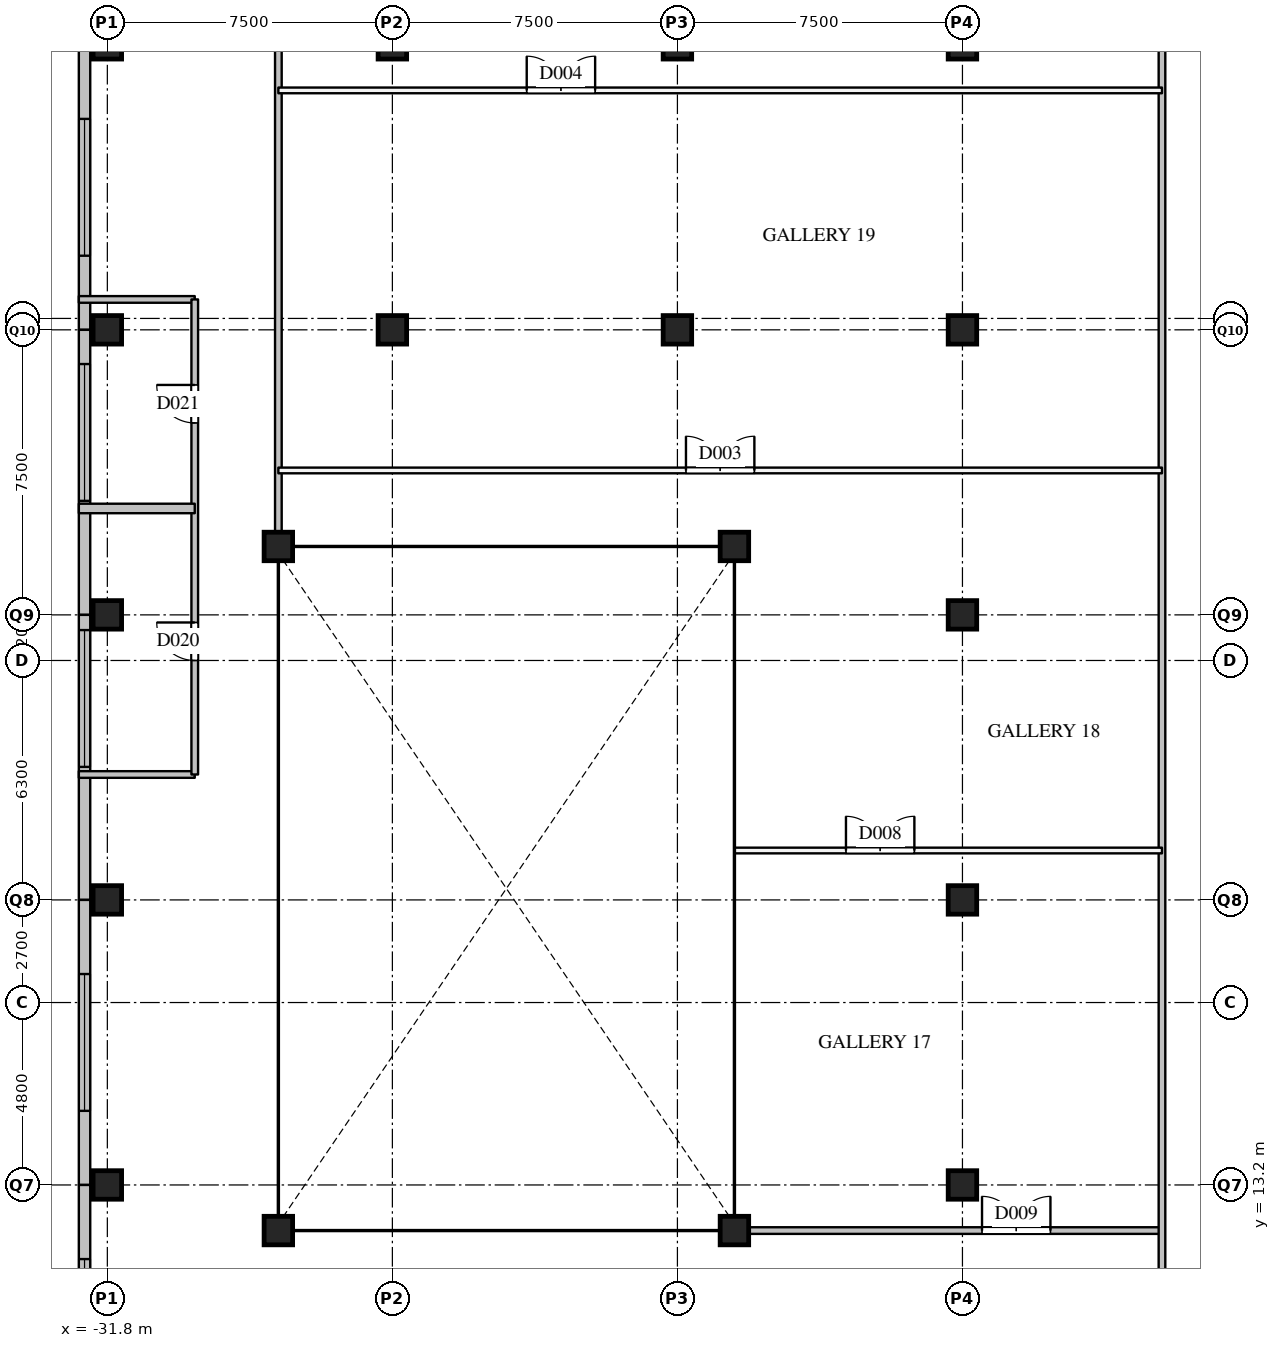
"""IFC4 building model, lengths in metres.
Left out: names, types, materials, properties, quantities, classifications, styles, units other than length and angle.
Written with IfcOpenShell. Run it as: python <this file> out.ifc"""

import sys

from ifc_helpers import new_model, si_unit, direction, frame, frame_2d, origin, origin_2d, place, context, subcontext, project, spatial, rectangle, extrude, element, fill, save


model = new_model("IFC4")
c1 = context("Model", 3, precision=1e-05, world=origin(), true_north=direction((0.0, 1.0)))
c2 = subcontext(c1, "Body", "Model", "MODEL_VIEW")
j1 = project(units=[si_unit("LENGTHUNIT", "METRE"), si_unit("PLANEANGLEUNIT", "RADIAN")], contexts=[c1])
p1 = place(None, origin())
s1 = spatial("IfcSite", under=j1, at=p1, CompositionType="ELEMENT")
p2 = place(p1, origin())
s2 = spatial("IfcBuilding", under=s1, at=p2, CompositionType="ELEMENT")
p3 = place(p2, frame((0.0, 0.0, 14.0)))
s3 = spatial("IfcBuildingStorey", under=s2, at=p3, CompositionType="ELEMENT", Elevation=14.0)
for number, where, z_axis, x_axis in (
    (1, (-31.8, 13.2, 0.0), (0.0, 0.0, 1.0), (1.0, 0.0, 0.0)),
    (2, (-31.8, 20.7, 0.0), (0.0, 0.0, 1.0), (1.0, 0.0, 0.0)),
    (3, (-31.8, 28.2, 0.0), (0.0, 0.0, 1.0), (1.0, 0.0, 0.0)),
    (4, (-31.8, 35.7, 0.0), (0.0, 0.0, 1.0), (1.0, 0.0, 0.0)),
    (5, (-31.8, 43.2, 0.0), (0.0, 0.0, 1.0), (1.0, 0.0, 0.0)),
    (6, (-24.3, 35.7, 0.0), (0.0, 0.0, 1.0), (1.0, 0.0, 0.0)),
    (7, (-24.3, 43.2, 0.0), (0.0, 0.0, 1.0), (1.0, 0.0, 0.0)),
    (8, (-16.8, 35.7, 0.0), (0.0, 0.0, 1.0), (1.0, 0.0, 0.0)),
    (9, (-16.8, 43.2, 0.0), (0.0, 0.0, 1.0), (1.0, 0.0, 0.0)),
    (10, (-9.3, 13.2, 0.0), (0.0, 0.0, 1.0), (1.0, 0.0, 0.0)),
    (11, (-9.3, 20.7, 0.0), (0.0, 0.0, 1.0), (1.0, 0.0, 0.0)),
    (12, (-9.3, 28.2, 0.0), (0.0, 0.0, 1.0), (1.0, 0.0, 0.0)),
    (13, (-9.3, 35.7, 0.0), (0.0, 0.0, 1.0), (1.0, 0.0, 0.0)),
    (14, (-9.3, 43.2, 0.0), (0.0, 0.0, 1.0), (1.0, 0.0, 0.0)),
    (15, (-27.3, 12.0, 0.0), (0.0, 0.0, 1.0), (1.0, 0.0, 0.0)),
    (16, (-15.3, 12.0, 0.0), (0.0, 0.0, 1.0), (1.0, 0.0, 0.0)),
    (17, (-15.3, 30.0, 0.0), (0.0, 0.0, 1.0), (1.0, 0.0, 0.0)),
    (18, (-27.3, 30.0, 0.0), (0.0, 0.0, 1.0), (1.0, 0.0, 0.0)),
):
    element("IfcColumn", number, at=place(p3, frame(where, z_axis=z_axis, x_axis=x_axis)), inside=s3, PredefinedType="COLUMN", context=c2, shape_type="SweptSolid", body=[
        extrude(rectangle(XDim=0.75, YDim=0.75, at=origin_2d()), origin(), (0.0, 0.0, 1.0), 7.0),
    ])
p4 = place(p3, frame((-32.4, 43.2, 0.0), z_axis=(0.0, 0.0, 1.0), x_axis=(0.0, -1.0, 0.0)))
e19 = element("IfcWall", 19, at=p4, inside=s3, PredefinedType="SOLIDWALL", context=c2, shape_type="SweptSolid", body=[
    extrude(rectangle(XDim=7.5, YDim=0.3, at=frame_2d((3.75, 0.0))), origin(), (0.0, 0.0, 1.0), 6.59),
])
p5 = place(p4, frame((1.95, 0.0, 0.9)))
e20 = element("IfcOpeningElement", 20, at=p5, cuts=e19, PredefinedType="OPENING", context=c2, shape_type="SweptSolid", body=[
    extrude(rectangle(XDim=3.6, YDim=3.0, at=frame_2d((1.8, 1.5))), frame((0.0, 0.16, 0.0), z_axis=(0.0, -1.0, 0.0), x_axis=(1.0, 0.0, 0.0)), (0.0, 0.0, 1.0), 0.32),
])
p6 = place(p3, frame((-32.4, 35.7, 0.0), z_axis=(0.0, 0.0, 1.0), x_axis=(0.0, -1.0, 0.0)))
e21 = element("IfcWall", 21, at=p6, inside=s3, PredefinedType="SOLIDWALL", context=c2, shape_type="SweptSolid", body=[
    extrude(rectangle(XDim=7.5, YDim=0.3, at=frame_2d((3.75, 0.0))), origin(), (0.0, 0.0, 1.0), 6.59),
])
p7 = place(p6, frame((0.9, 0.0, 0.9)))
e22 = element("IfcOpeningElement", 22, at=p7, cuts=e21, PredefinedType="OPENING", context=c2, shape_type="SweptSolid", body=[
    extrude(rectangle(XDim=3.6, YDim=3.0, at=frame_2d((1.8, 1.5))), frame((0.0, 0.16, 0.0), z_axis=(0.0, -1.0, 0.0), x_axis=(1.0, 0.0, 0.0)), (0.0, 0.0, 1.0), 0.32),
])
p8 = place(p3, frame((-32.4, 28.2, 0.0), z_axis=(0.0, 0.0, 1.0), x_axis=(0.0, -1.0, 0.0)))
e23 = element("IfcWall", 23, at=p8, inside=s3, PredefinedType="SOLIDWALL", context=c2, shape_type="SweptSolid", body=[
    extrude(rectangle(XDim=7.5, YDim=0.3, at=frame_2d((3.75, 0.0))), origin(), (0.0, 0.0, 1.0), 6.59),
])
p9 = place(p8, frame((0.4, 0.0, 0.9)))
e24 = element("IfcOpeningElement", 24, at=p9, cuts=e23, PredefinedType="OPENING", context=c2, shape_type="SweptSolid", body=[
    extrude(rectangle(XDim=3.6, YDim=3.0, at=frame_2d((1.8, 1.5))), frame((0.0, 0.16, 0.0), z_axis=(0.0, -1.0, 0.0), x_axis=(1.0, 0.0, 0.0)), (0.0, 0.0, 1.0), 0.32),
])
p10 = place(p3, frame((-32.4, 20.7, 0.0), z_axis=(0.0, 0.0, 1.0), x_axis=(0.0, -1.0, 0.0)))
e25 = element("IfcWall", 25, at=p10, inside=s3, PredefinedType="SOLIDWALL", context=c2, shape_type="SweptSolid", body=[
    extrude(rectangle(XDim=7.5, YDim=0.3, at=frame_2d((3.75, 0.0))), origin(), (0.0, 0.0, 1.0), 6.59),
])
p11 = place(p10, frame((1.95, 0.0, 0.9)))
e26 = element("IfcOpeningElement", 26, at=p11, cuts=e25, PredefinedType="OPENING", context=c2, shape_type="SweptSolid", body=[
    extrude(rectangle(XDim=3.6, YDim=3.0, at=frame_2d((1.8, 1.5))), frame((0.0, 0.16, 0.0), z_axis=(0.0, -1.0, 0.0), x_axis=(1.0, 0.0, 0.0)), (0.0, 0.0, 1.0), 0.32),
])
p12 = place(p3, frame((-32.4, 13.2, 0.0), z_axis=(0.0, 0.0, 1.0), x_axis=(0.0, -1.0, 0.0)))
e27 = element("IfcWall", 27, at=p12, inside=s3, PredefinedType="SOLIDWALL", context=c2, shape_type="SweptSolid", body=[
    extrude(rectangle(XDim=7.5, YDim=0.3, at=frame_2d((3.75, 0.0))), origin(), (0.0, 0.0, 1.0), 6.59),
])
p13 = place(p12, frame((1.95, 0.0, 0.9)))
e28 = element("IfcOpeningElement", 28, at=p13, cuts=e27, PredefinedType="OPENING", context=c2, shape_type="SweptSolid", body=[
    extrude(rectangle(XDim=3.6, YDim=3.0, at=frame_2d((1.8, 1.5))), frame((0.0, 0.16, 0.0), z_axis=(0.0, -1.0, 0.0), x_axis=(1.0, 0.0, 0.0)), (0.0, 0.0, 1.0), 0.32),
])
p14 = place(p3, frame((-15.3, 12.0, 0.0), z_axis=(0.0, 0.0, 1.0), x_axis=(1.0, 0.0, 0.0)))
e29 = element("IfcWall", 29, at=p14, inside=s3, PredefinedType="PARTITIONING", context=c2, shape_type="SweptSolid", body=[
    extrude(rectangle(XDim=11.25, YDim=0.175, at=frame_2d((5.625, 0.0))), origin(), (0.0, 0.0, 1.0), 5.79),
])
p15 = place(p14, frame((6.515, 0.0, 0.0)))
e30 = element("IfcOpeningElement", 30, at=p15, cuts=e29, PredefinedType="OPENING", context=c2, shape_type="SweptSolid", body=[
    extrude(rectangle(XDim=1.8, YDim=2.1, at=frame_2d((0.9, 1.05))), frame((0.0, 0.097, 0.0), z_axis=(0.0, -1.0, 0.0), x_axis=(1.0, 0.0, 0.0)), (0.0, 0.0, 1.0), 0.195),
])
for number, where, z_axis, x_axis in (
    (31, (-32.55, 24.0, 0.0), (0.0, 0.0, 1.0), (1.0, 0.0, 0.0)),
    (32, (-32.55, 36.5, 0.0), (0.0, 0.0, 1.0), (1.0, 0.0, 0.0)),
):
    element("IfcWall", number, at=place(p3, frame(where, z_axis=z_axis, x_axis=x_axis)), inside=s3, PredefinedType="PARTITIONING", context=c2, shape_type="SweptSolid", body=[
        extrude(rectangle(XDim=3.05, YDim=0.175, at=frame_2d((1.525, 0.0))), origin(), (0.0, 0.0, 1.0), 5.79),
    ])
p16 = place(p3, frame((-29.5, 24.0, 0.0), z_axis=(0.0, 0.0, 1.0), x_axis=(0.0, 1.0, 0.0)))
e33 = element("IfcWall", 33, at=p16, inside=s3, PredefinedType="PARTITIONING", context=c2, shape_type="SweptSolid", body=[
    extrude(rectangle(XDim=12.5, YDim=0.175, at=frame_2d((6.25, 0.0))), origin(), (0.0, 0.0, 1.0), 5.79),
])
p17 = place(p16, frame((3.0, 0.0, 0.0)))
e34 = element("IfcOpeningElement", 34, at=p17, cuts=e33, PredefinedType="OPENING", context=c2, shape_type="SweptSolid", body=[
    extrude(rectangle(XDim=1.0, YDim=2.1, at=frame_2d((0.5, 1.05))), frame((0.0, 0.097, 0.0), z_axis=(0.0, -1.0, 0.0), x_axis=(1.0, 0.0, 0.0)), (0.0, 0.0, 1.0), 0.195),
])
p18 = place(p16, frame((9.25, 0.0, 0.0)))
e35 = element("IfcOpeningElement", 35, at=p18, cuts=e33, PredefinedType="OPENING", context=c2, shape_type="SweptSolid", body=[
    extrude(rectangle(XDim=1.0, YDim=2.1, at=frame_2d((0.5, 1.05))), frame((0.0, 0.097, 0.0), z_axis=(0.0, -1.0, 0.0), x_axis=(1.0, 0.0, 0.0)), (0.0, 0.0, 1.0), 0.195),
])
p19 = place(p3, frame((-27.3, 30.0, 0.0), z_axis=(0.0, 0.0, 1.0), x_axis=(0.0, 1.0, 0.0)))
e36 = element("IfcWall", 36, at=p19, inside=s3, PredefinedType="PARTITIONING", context=c2, shape_type="SweptSolid", body=[
    extrude(rectangle(XDim=17.35, YDim=0.175, at=frame_2d((8.675, 0.0))), origin(), (0.0, 0.0, 1.0), 5.79),
])
p20 = place(p3, frame((-4.05, -4.05, 0.0), z_axis=(0.0, 0.0, 1.0), x_axis=(0.0, 1.0, 0.0)))
e37 = element("IfcWall", 37, at=p20, inside=s3, PredefinedType="PARTITIONING", context=c2, shape_type="SweptSolid", body=[
    extrude(rectangle(XDim=63.0, YDim=0.175, at=frame_2d((31.5, 0.0))), origin(), (0.0, 0.0, 1.0), 5.79),
])
p21 = place(p20, frame((7.125, 0.0, 0.0)))
e38 = element("IfcOpeningElement", 38, at=p21, cuts=e37, PredefinedType="OPENING", context=c2, shape_type="SweptSolid", body=[
    extrude(rectangle(XDim=1.8, YDim=2.1, at=frame_2d((0.9, 1.05))), frame((0.0, 0.097, 0.0), z_axis=(0.0, -1.0, 0.0), x_axis=(1.0, 0.0, 0.0)), (0.0, 0.0, 1.0), 0.195),
])
p22 = place(p3, frame((-15.3, 22.0, 0.0), z_axis=(0.0, 0.0, 1.0), x_axis=(1.0, 0.0, 0.0)))
e39 = element("IfcWall", 39, at=p22, inside=s3, PredefinedType="PARTITIONING", context=c2, shape_type="SweptSolid", body=[
    extrude(rectangle(XDim=11.25, YDim=0.15, at=frame_2d((5.625, 0.0))), origin(), (0.0, 0.0, 1.0), 5.79),
])
p23 = place(p22, frame((2.935, 0.0, 0.0)))
e40 = element("IfcOpeningElement", 40, at=p23, cuts=e39, PredefinedType="OPENING", context=c2, shape_type="SweptSolid", body=[
    extrude(rectangle(XDim=1.8, YDim=2.1, at=frame_2d((0.9, 1.05))), frame((0.0, 0.085, 0.0), z_axis=(0.0, -1.0, 0.0), x_axis=(1.0, 0.0, 0.0)), (0.0, 0.0, 1.0), 0.17),
])
p24 = place(p3, frame((-27.3, 32.0, 0.0), z_axis=(0.0, 0.0, 1.0), x_axis=(1.0, 0.0, 0.0)))
e41 = element("IfcWall", 41, at=p24, inside=s3, PredefinedType="PARTITIONING", context=c2, shape_type="SweptSolid", body=[
    extrude(rectangle(XDim=23.25, YDim=0.15, at=frame_2d((11.625, 0.0))), origin(), (0.0, 0.0, 1.0), 5.79),
])
p25 = place(p24, frame((10.725, 0.0, 0.0)))
e42 = element("IfcOpeningElement", 42, at=p25, cuts=e41, PredefinedType="OPENING", context=c2, shape_type="SweptSolid", body=[
    extrude(rectangle(XDim=1.8, YDim=2.1, at=frame_2d((0.9, 1.05))), frame((0.0, 0.085, 0.0), z_axis=(0.0, -1.0, 0.0), x_axis=(1.0, 0.0, 0.0)), (0.0, 0.0, 1.0), 0.17),
])
p26 = place(p3, frame((-27.3, 42.0, 0.0), z_axis=(0.0, 0.0, 1.0), x_axis=(1.0, 0.0, 0.0)))
e43 = element("IfcWall", 43, at=p26, inside=s3, PredefinedType="PARTITIONING", context=c2, shape_type="SweptSolid", body=[
    extrude(rectangle(XDim=23.25, YDim=0.15, at=frame_2d((11.625, 0.0))), origin(), (0.0, 0.0, 1.0), 5.79),
])
p27 = place(p26, frame((6.535, 0.0, 0.0)))
e44 = element("IfcOpeningElement", 44, at=p27, cuts=e43, PredefinedType="OPENING", context=c2, shape_type="SweptSolid", body=[
    extrude(rectangle(XDim=1.8, YDim=2.1, at=frame_2d((0.9, 1.05))), frame((0.0, 0.085, 0.0), z_axis=(0.0, -1.0, 0.0), x_axis=(1.0, 0.0, 0.0)), (0.0, 0.0, 1.0), 0.17),
])
p28 = place(p3, frame((-32.55, 31.0, 0.0), z_axis=(0.0, 0.0, 1.0), x_axis=(1.0, 0.0, 0.0)))
e45 = element("IfcWall", 45, at=p28, inside=s3, PredefinedType="PARTITIONING", context=c2, shape_type="SweptSolid", body=[
    extrude(rectangle(XDim=3.05, YDim=0.25, at=frame_2d((1.525, 0.0))), origin(), (0.0, 0.0, 1.0), 5.79),
])
p29 = place(p5, origin())
e46 = element("IfcWindow", 46, at=p29, inside=s3, PartitioningType="SINGLE_PANEL", PredefinedType="WINDOW", context=c2, shape_type="SweptSolid", body=[
    extrude(rectangle(XDim=3.6, YDim=3.0, at=frame_2d((1.8, 1.5))), frame((0.0, 0.03, 0.0), z_axis=(0.0, -1.0, 0.0), x_axis=(1.0, 0.0, 0.0)), (0.0, 0.0, 1.0), 0.06),
])
fill(e20, e46)
p30 = place(p7, origin())
e47 = element("IfcWindow", 47, at=p30, inside=s3, PartitioningType="SINGLE_PANEL", PredefinedType="WINDOW", context=c2, shape_type="SweptSolid", body=[
    extrude(rectangle(XDim=3.6, YDim=3.0, at=frame_2d((1.8, 1.5))), frame((0.0, 0.03, 0.0), z_axis=(0.0, -1.0, 0.0), x_axis=(1.0, 0.0, 0.0)), (0.0, 0.0, 1.0), 0.06),
])
fill(e22, e47)
p31 = place(p9, origin())
e48 = element("IfcWindow", 48, at=p31, inside=s3, PartitioningType="SINGLE_PANEL", PredefinedType="WINDOW", context=c2, shape_type="SweptSolid", body=[
    extrude(rectangle(XDim=3.6, YDim=3.0, at=frame_2d((1.8, 1.5))), frame((0.0, 0.03, 0.0), z_axis=(0.0, -1.0, 0.0), x_axis=(1.0, 0.0, 0.0)), (0.0, 0.0, 1.0), 0.06),
])
fill(e24, e48)
p32 = place(p11, origin())
e49 = element("IfcWindow", 49, at=p32, inside=s3, PartitioningType="SINGLE_PANEL", PredefinedType="WINDOW", context=c2, shape_type="SweptSolid", body=[
    extrude(rectangle(XDim=3.6, YDim=3.0, at=frame_2d((1.8, 1.5))), frame((0.0, 0.03, 0.0), z_axis=(0.0, -1.0, 0.0), x_axis=(1.0, 0.0, 0.0)), (0.0, 0.0, 1.0), 0.06),
])
fill(e26, e49)
p33 = place(p13, origin())
e50 = element("IfcWindow", 50, at=p33, inside=s3, PartitioningType="SINGLE_PANEL", PredefinedType="WINDOW", context=c2, shape_type="SweptSolid", body=[
    extrude(rectangle(XDim=3.6, YDim=3.0, at=frame_2d((1.8, 1.5))), frame((0.0, 0.03, 0.0), z_axis=(0.0, -1.0, 0.0), x_axis=(1.0, 0.0, 0.0)), (0.0, 0.0, 1.0), 0.06),
])
fill(e28, e50)
p34 = place(p25, origin())
e51 = element("IfcDoor", 51, at=p34, inside=s3, OperationType="DOUBLE_DOOR_SINGLE_SWING", PredefinedType="DOOR", context=c2, shape_type="SweptSolid", body=[
    extrude(rectangle(XDim=1.8, YDim=2.1, at=frame_2d((0.9, 1.05))), frame((0.0, 0.025, 0.0), z_axis=(0.0, -1.0, 0.0), x_axis=(1.0, 0.0, 0.0)), (0.0, 0.0, 1.0), 0.05),
])
fill(e42, e51)
p35 = place(p27, origin())
e52 = element("IfcDoor", 52, at=p35, inside=s3, OperationType="DOUBLE_DOOR_SINGLE_SWING", PredefinedType="DOOR", context=c2, shape_type="SweptSolid", body=[
    extrude(rectangle(XDim=1.8, YDim=2.1, at=frame_2d((0.9, 1.05))), frame((0.0, 0.025, 0.0), z_axis=(0.0, -1.0, 0.0), x_axis=(1.0, 0.0, 0.0)), (0.0, 0.0, 1.0), 0.05),
])
fill(e44, e52)
p36 = place(p23, origin())
e53 = element("IfcDoor", 53, at=p36, inside=s3, OperationType="DOUBLE_DOOR_SINGLE_SWING", PredefinedType="DOOR", context=c2, shape_type="SweptSolid", body=[
    extrude(rectangle(XDim=1.8, YDim=2.1, at=frame_2d((0.9, 1.05))), frame((0.0, 0.025, 0.0), z_axis=(0.0, -1.0, 0.0), x_axis=(1.0, 0.0, 0.0)), (0.0, 0.0, 1.0), 0.05),
])
fill(e40, e53)
p37 = place(p15, origin())
e54 = element("IfcDoor", 54, at=p37, inside=s3, OperationType="DOUBLE_DOOR_SINGLE_SWING", PredefinedType="DOOR", context=c2, shape_type="SweptSolid", body=[
    extrude(rectangle(XDim=1.8, YDim=2.1, at=frame_2d((0.9, 1.05))), frame((0.0, 0.025, 0.0), z_axis=(0.0, -1.0, 0.0), x_axis=(1.0, 0.0, 0.0)), (0.0, 0.0, 1.0), 0.05),
])
fill(e30, e54)
p38 = place(p17, origin())
e55 = element("IfcDoor", 55, at=p38, inside=s3, OperationType="SINGLE_SWING_RIGHT", PredefinedType="DOOR", context=c2, shape_type="SweptSolid", body=[
    extrude(rectangle(XDim=1.0, YDim=2.1, at=frame_2d((0.5, 1.05))), frame((0.0, 0.025, 0.0), z_axis=(0.0, -1.0, 0.0), x_axis=(1.0, 0.0, 0.0)), (0.0, 0.0, 1.0), 0.05),
])
fill(e34, e55)
p39 = place(p18, origin())
e56 = element("IfcDoor", 56, at=p39, inside=s3, OperationType="SINGLE_SWING_RIGHT", PredefinedType="DOOR", context=c2, shape_type="SweptSolid", body=[
    extrude(rectangle(XDim=1.0, YDim=2.1, at=frame_2d((0.5, 1.05))), frame((0.0, 0.025, 0.0), z_axis=(0.0, -1.0, 0.0), x_axis=(1.0, 0.0, 0.0)), (0.0, 0.0, 1.0), 0.05),
])
fill(e35, e56)
save(model, sys.argv[1])
